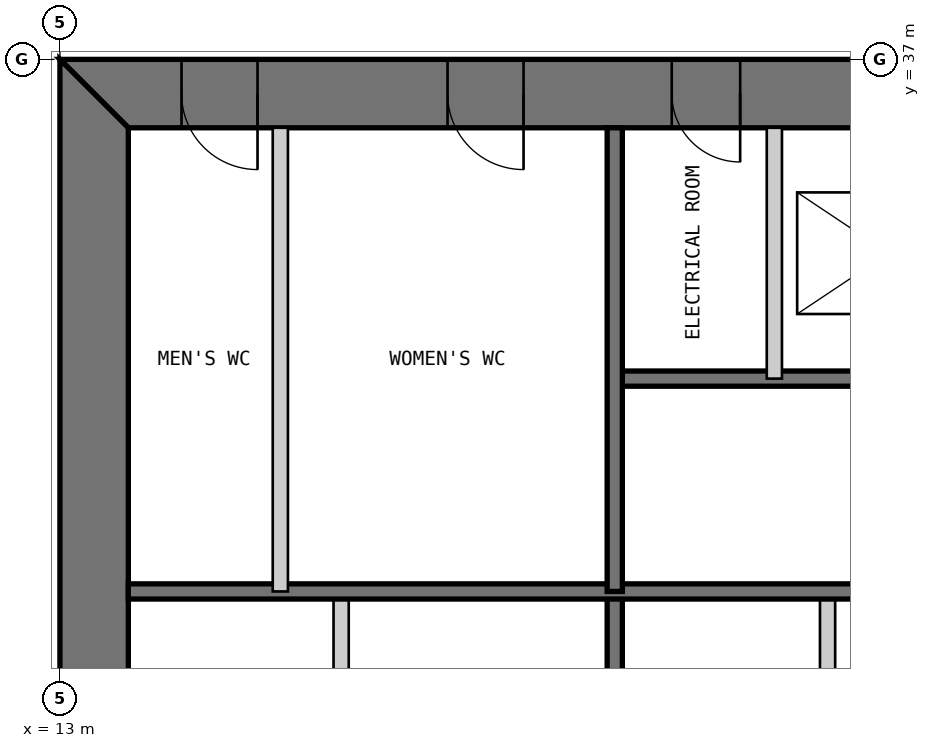
"""IFC4 building model, lengths in metres.
Left out: names, types, materials, properties, quantities, classifications, styles, units other than length and angle.
Written with IfcOpenShell. Run it as: python <this file> out.ifc"""

import sys

from ifc_helpers import new_model, si_unit, direction, frame, frame_2d, origin, place, context, subcontext, project, spatial, polyline, rectangle, outline, extrude, element, fill, save


model = new_model("IFC4")
c1 = context("Model", 3, precision=1e-05, world=origin(), true_north=direction((0.0, 1.0)))
c2 = subcontext(c1, "Body", "Model", "MODEL_VIEW")
j1 = project(units=[si_unit("LENGTHUNIT", "METRE"), si_unit("PLANEANGLEUNIT", "RADIAN")], contexts=[c1])
p1 = place(None, origin())
s1 = spatial("IfcSite", under=j1, at=p1, CompositionType="ELEMENT")
p2 = place(p1, origin())
s2 = spatial("IfcBuilding", under=s1, at=p2, CompositionType="ELEMENT")
p3 = place(p2, frame((0.0, 0.0, 286.6)))
s3 = spatial("IfcBuildingStorey", under=s2, at=p3, CompositionType="ELEMENT", Elevation=286.6)
p4 = place(p3, frame((37.0, 36.55, 0.0), z_axis=(0.0, 0.0, 1.0), x_axis=(-1.0, 0.0, 0.0)))
e1 = element("IfcWall", 1, at=p4, inside=s3, PredefinedType="SHEAR", context=c2, shape_type="SweptSolid", body=[
    extrude(outline(polyline([(0.0, -0.45), (24.0, -0.45), (23.1, 0.45), (0.9, 0.45), (0.0, -0.45)])), origin(), (0.0, 0.0, 1.0), 3.4),
])
p5 = place(p4, frame((4.9, 0.0, 0.0)))
e2 = element("IfcOpeningElement", 2, at=p5, cuts=e1, PredefinedType="OPENING", context=c2, shape_type="SweptSolid", body=[
    extrude(rectangle(XDim=1.0, YDim=2.2, at=frame_2d((0.5, 1.1))), frame((0.0, 0.46, 0.0), z_axis=(0.0, -1.0, 0.0), x_axis=(1.0, 0.0, 0.0)), (0.0, 0.0, 1.0), 0.92),
])
p6 = place(p4, frame((8.9, 0.0, 0.0)))
e3 = element("IfcOpeningElement", 3, at=p6, cuts=e1, PredefinedType="OPENING", context=c2, shape_type="SweptSolid", body=[
    extrude(rectangle(XDim=1.1, YDim=2.2, at=frame_2d((0.55, 1.1))), frame((0.0, 0.46, 0.0), z_axis=(0.0, -1.0, 0.0), x_axis=(1.0, 0.0, 0.0)), (0.0, 0.0, 1.0), 0.92),
])
p7 = place(p4, frame((15.05, 0.0, 0.0)))
e4 = element("IfcOpeningElement", 4, at=p7, cuts=e1, PredefinedType="OPENING", context=c2, shape_type="SweptSolid", body=[
    extrude(rectangle(XDim=0.9, YDim=2.2, at=frame_2d((0.45, 1.1))), frame((0.0, 0.46, 0.0), z_axis=(0.0, -1.0, 0.0), x_axis=(1.0, 0.0, 0.0)), (0.0, 0.0, 1.0), 0.92),
])
p8 = place(p4, frame((17.9, 0.0, 0.0)))
e5 = element("IfcOpeningElement", 5, at=p8, cuts=e1, PredefinedType="OPENING", context=c2, shape_type="SweptSolid", body=[
    extrude(rectangle(XDim=1.0, YDim=2.2, at=frame_2d((0.5, 1.1))), frame((0.0, 0.46, 0.0), z_axis=(0.0, -1.0, 0.0), x_axis=(1.0, 0.0, 0.0)), (0.0, 0.0, 1.0), 0.92),
])
p9 = place(p4, frame((21.4, 0.0, 0.0)))
e6 = element("IfcOpeningElement", 6, at=p9, cuts=e1, PredefinedType="OPENING", context=c2, shape_type="SweptSolid", body=[
    extrude(rectangle(XDim=1.0, YDim=2.2, at=frame_2d((0.5, 1.1))), frame((0.0, 0.46, 0.0), z_axis=(0.0, -1.0, 0.0), x_axis=(1.0, 0.0, 0.0)), (0.0, 0.0, 1.0), 0.92),
])
p10 = place(p3, frame((13.45, 36.1, 0.0), z_axis=(0.0, 0.0, 1.0), x_axis=(0.0, -1.0, 0.0)))
e7 = element("IfcWall", 7, at=p10, inside=s3, PredefinedType="SHEAR", context=c2, shape_type="SweptSolid", body=[
    extrude(outline(polyline([(-0.9, -0.45), (23.1, -0.45), (22.2, 0.45), (0.0, 0.45), (-0.9, -0.45)])), origin(), (0.0, 0.0, 1.0), 3.4),
])
p11 = place(p10, frame((20.2, 0.0, 0.0)))
e8 = element("IfcOpeningElement", 8, at=p11, cuts=e7, PredefinedType="OPENING", context=c2, shape_type="SweptSolid", body=[
    extrude(rectangle(XDim=1.0, YDim=2.2, at=frame_2d((0.5, 1.1))), frame((0.0, 0.46, 0.0), z_axis=(0.0, -1.0, 0.0), x_axis=(1.0, 0.0, 0.0)), (0.0, 0.0, 1.0), 0.92),
])
p12 = place(p10, frame((17.25, 0.0, 0.0)))
e9 = element("IfcOpeningElement", 9, at=p12, cuts=e7, PredefinedType="OPENING", context=c2, shape_type="SweptSolid", body=[
    extrude(rectangle(XDim=0.9, YDim=2.2, at=frame_2d((0.45, 1.1))), frame((0.0, 0.46, 0.0), z_axis=(0.0, -1.0, 0.0), x_axis=(1.0, 0.0, 0.0)), (0.0, 0.0, 1.0), 0.92),
])
p13 = place(p3, frame((16.7, 13.9, 0.0), z_axis=(0.0, 0.0, 1.0), x_axis=(0.0, 1.0, 0.0)))
e10 = element("IfcWall", 10, at=p13, inside=s3, PredefinedType="PARTITIONING", context=c2, shape_type="SweptSolid", body=[
    extrude(rectangle(XDim=16.1, YDim=0.2, at=frame_2d((8.05, 0.0))), origin(), (0.0, 0.0, 1.0), 3.2),
])
p14 = place(p13, frame((6.15, 0.0, 0.0)))
e11 = element("IfcOpeningElement", 11, at=p14, cuts=e10, PredefinedType="OPENING", context=c2, shape_type="SweptSolid", body=[
    extrude(rectangle(XDim=0.9, YDim=2.2, at=frame_2d((0.45, 1.1))), frame((0.0, 0.11, 0.0), z_axis=(0.0, -1.0, 0.0), x_axis=(1.0, 0.0, 0.0)), (0.0, 0.0, 1.0), 0.22),
])
p15 = place(p13, frame((8.65, 0.0, 0.0)))
e12 = element("IfcOpeningElement", 12, at=p15, cuts=e10, PredefinedType="OPENING", context=c2, shape_type="SweptSolid", body=[
    extrude(rectangle(XDim=0.9, YDim=2.2, at=frame_2d((0.45, 1.1))), frame((0.0, 0.11, 0.0), z_axis=(0.0, -1.0, 0.0), x_axis=(1.0, 0.0, 0.0)), (0.0, 0.0, 1.0), 0.22),
])
p16 = place(p13, frame((12.8, 0.0, 0.0)))
e13 = element("IfcOpeningElement", 13, at=p16, cuts=e10, PredefinedType="OPENING", context=c2, shape_type="SweptSolid", body=[
    extrude(rectangle(XDim=0.9, YDim=2.2, at=frame_2d((0.45, 1.1))), frame((0.0, 0.11, 0.0), z_axis=(0.0, -1.0, 0.0), x_axis=(1.0, 0.0, 0.0)), (0.0, 0.0, 1.0), 0.22),
])
p17 = place(p3, frame((20.3, 13.9, 0.0), z_axis=(0.0, 0.0, 1.0), x_axis=(0.0, 1.0, 0.0)))
e14 = element("IfcWall", 14, at=p17, inside=s3, PredefinedType="SOLIDWALL", context=c2, shape_type="SweptSolid", body=[
    extrude(rectangle(XDim=16.1, YDim=0.2, at=frame_2d((8.05, 0.0))), origin(), (0.0, 0.0, 1.0), 3.2),
])
p18 = place(p17, frame((6.4, 0.0, 0.0)))
e15 = element("IfcOpeningElement", 15, at=p18, cuts=e14, PredefinedType="OPENING", context=c2, shape_type="SweptSolid", body=[
    extrude(rectangle(XDim=0.9, YDim=2.2, at=frame_2d((0.45, 1.1))), frame((0.0, 0.11, 0.0), z_axis=(0.0, -1.0, 0.0), x_axis=(1.0, 0.0, 0.0)), (0.0, 0.0, 1.0), 0.22),
])
p19 = place(p17, frame((11.4, 0.0, 0.0)))
e16 = element("IfcOpeningElement", 16, at=p19, cuts=e14, PredefinedType="OPENING", context=c2, shape_type="SweptSolid", body=[
    extrude(rectangle(XDim=0.9, YDim=2.2, at=frame_2d((0.45, 1.1))), frame((0.0, 0.11, 0.0), z_axis=(0.0, -1.0, 0.0), x_axis=(1.0, 0.0, 0.0)), (0.0, 0.0, 1.0), 0.22),
])
p20 = place(p3, frame((23.1, 20.0, 0.0), z_axis=(0.0, 0.0, 1.0), x_axis=(0.0, 1.0, 0.0)))
e17 = element("IfcWall", 17, at=p20, inside=s3, PredefinedType="PARTITIONING", context=c2, shape_type="SweptSolid", body=[
    extrude(rectangle(XDim=10.0, YDim=0.2, at=frame_2d((5.0, 0.0))), origin(), (0.0, 0.0, 1.0), 3.2),
])
p21 = place(p3, frame((29.7, 32.8, 0.0), z_axis=(0.0, 0.0, 1.0), x_axis=(-1.0, 0.0, 0.0)))
e18 = element("IfcWall", 18, at=p21, inside=s3, PredefinedType="SOLIDWALL", context=c2, shape_type="SweptSolid", body=[
    extrude(rectangle(XDim=9.4, YDim=0.2, at=frame_2d((4.7, 0.0))), origin(), (0.0, 0.0, 1.0), 3.2),
])
p22 = place(p21, frame((0.25, 0.0, 0.0)))
e19 = element("IfcOpeningElement", 19, at=p22, cuts=e18, PredefinedType="OPENING", context=c2, shape_type="SweptSolid", body=[
    extrude(rectangle(XDim=1.0, YDim=2.2, at=frame_2d((0.5, 1.1))), frame((0.0, 0.11, 0.0), z_axis=(0.0, -1.0, 0.0), x_axis=(1.0, 0.0, 0.0)), (0.0, 0.0, 1.0), 0.22),
])
p23 = place(p3, frame((29.7, 30.0, 0.0), z_axis=(0.0, 0.0, 1.0), x_axis=(-1.0, 0.0, 0.0)))
e20 = element("IfcWall", 20, at=p23, inside=s3, PredefinedType="SOLIDWALL", context=c2, shape_type="SweptSolid", body=[
    extrude(rectangle(XDim=15.8, YDim=0.2, at=frame_2d((7.9, 0.0))), origin(), (0.0, 0.0, 1.0), 3.2),
])
p24 = place(p3, frame((22.4, 36.1, 0.0), z_axis=(0.0, 0.0, 1.0), x_axis=(0.0, -1.0, 0.0)))
e21 = element("IfcWall", 21, at=p24, inside=s3, PredefinedType="PARTITIONING", context=c2, shape_type="SweptSolid", body=[
    extrude(rectangle(XDim=3.3, YDim=0.2, at=frame_2d((1.65, 0.0))), origin(), (0.0, 0.0, 1.0), 3.2),
])
p25 = place(p3, frame((20.3, 36.1, 0.0), z_axis=(0.0, 0.0, 1.0), x_axis=(0.0, -1.0, 0.0)))
e22 = element("IfcWall", 22, at=p25, inside=s3, PredefinedType="SOLIDWALL", context=c2, shape_type="SweptSolid", body=[
    extrude(rectangle(XDim=6.1, YDim=0.2, at=frame_2d((3.05, 0.0))), origin(), (0.0, 0.0, 1.0), 3.2),
])
p26 = place(p3, frame((15.9, 36.1, 0.0), z_axis=(0.0, 0.0, 1.0), x_axis=(0.0, -1.0, 0.0)))
e23 = element("IfcWall", 23, at=p26, inside=s3, PredefinedType="PARTITIONING", context=c2, shape_type="SweptSolid", body=[
    extrude(rectangle(XDim=6.1, YDim=0.2, at=frame_2d((3.05, 0.0))), origin(), (0.0, 0.0, 1.0), 3.2),
])
p27 = place(p7, origin())
e24 = element("IfcDoor", 24, at=p27, inside=s3, OperationType="SINGLE_SWING_LEFT", PredefinedType="DOOR", context=c2, shape_type="SweptSolid", body=[
    extrude(rectangle(XDim=0.9, YDim=2.2, at=frame_2d((0.45, 1.1))), frame((0.0, 0.025, 0.0), z_axis=(0.0, -1.0, 0.0), x_axis=(1.0, 0.0, 0.0)), (0.0, 0.0, 1.0), 0.05),
    extrude(outline(polyline([(0.0, 0.0), (0.04, 0.0), (0.04, 2.16), (0.86, 2.16), (0.86, 0.0), (0.9, 0.0), (0.9, 2.2), (0.0, 2.2), (0.0, 0.0)])), frame((0.0, 0.3, 0.0), z_axis=(0.0, -1.0, 0.0), x_axis=(1.0, 0.0, 0.0)), (0.0, 0.0, 1.0), 0.6),
])
fill(e4, e24)
p28 = place(p8, origin())
e25 = element("IfcDoor", 25, at=p28, inside=s3, OperationType="SINGLE_SWING_LEFT", PredefinedType="DOOR", context=c2, shape_type="SweptSolid", body=[
    extrude(rectangle(XDim=1.0, YDim=2.2, at=frame_2d((0.5, 1.1))), frame((0.0, 0.025, 0.0), z_axis=(0.0, -1.0, 0.0), x_axis=(1.0, 0.0, 0.0)), (0.0, 0.0, 1.0), 0.05),
    extrude(outline(polyline([(0.0, 0.0), (0.04, 0.0), (0.04, 2.16), (0.96, 2.16), (0.96, 0.0), (1.0, 0.0), (1.0, 2.2), (0.0, 2.2), (0.0, 0.0)])), frame((0.0, 0.3, 0.0), z_axis=(0.0, -1.0, 0.0), x_axis=(1.0, 0.0, 0.0)), (0.0, 0.0, 1.0), 0.6),
])
fill(e5, e25)
p29 = place(p9, origin())
e26 = element("IfcDoor", 26, at=p29, inside=s3, OperationType="SINGLE_SWING_LEFT", PredefinedType="DOOR", context=c2, shape_type="SweptSolid", body=[
    extrude(rectangle(XDim=1.0, YDim=2.2, at=frame_2d((0.5, 1.1))), frame((0.0, 0.025, 0.0), z_axis=(0.0, -1.0, 0.0), x_axis=(1.0, 0.0, 0.0)), (0.0, 0.0, 1.0), 0.05),
    extrude(outline(polyline([(0.0, 0.0), (0.04, 0.0), (0.04, 2.16), (0.96, 2.16), (0.96, 0.0), (1.0, 0.0), (1.0, 2.2), (0.0, 2.2), (0.0, 0.0)])), frame((0.0, 0.3, 0.0), z_axis=(0.0, -1.0, 0.0), x_axis=(1.0, 0.0, 0.0)), (0.0, 0.0, 1.0), 0.6),
])
fill(e6, e26)
save(model, sys.argv[1])
